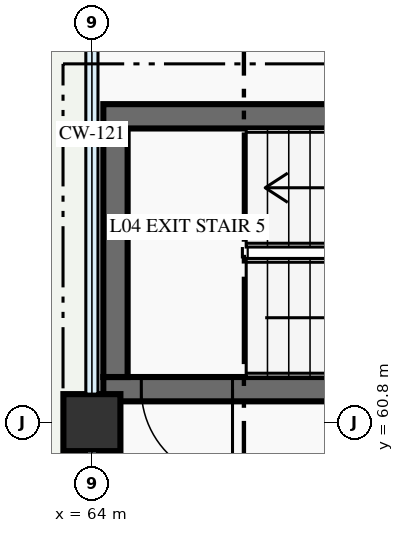
"""IFC4 building model, lengths in metres.
Left out: names, types, materials, properties, quantities, classifications, styles, units other than length and angle.
Written with IfcOpenShell. Run it as: python <this file> out.ifc"""

import sys

from ifc_helpers import new_model, si_unit, direction, frame, frame_2d, origin, origin_2d, place, context, subcontext, project, spatial, rectangle, extrude, element, fill, save


model = new_model("IFC4")
c1 = context("Model", 3, precision=1e-05, world=origin(), true_north=direction((0.0, 1.0)))
c2 = subcontext(c1, "Body", "Model", "MODEL_VIEW")
j1 = project(units=[si_unit("LENGTHUNIT", "METRE"), si_unit("PLANEANGLEUNIT", "RADIAN")], contexts=[c1])
p1 = place(None, origin())
s1 = spatial("IfcSite", under=j1, at=p1, CompositionType="ELEMENT")
p2 = place(p1, origin())
s2 = spatial("IfcBuilding", under=s1, at=p2, CompositionType="ELEMENT")
p3 = place(p2, frame((0.0, 0.0, 14.7)))
s3 = spatial("IfcBuildingStorey", under=s2, at=p3, CompositionType="ELEMENT", Elevation=14.7)
p4 = place(p3, frame((64.0, 60.8, 0.0), z_axis=(0.0, 0.0, 1.0), x_axis=(1.0, 0.0, 0.0)))
e1 = element("IfcColumn", 1, at=p4, inside=s3, PredefinedType="COLUMN", context=c2, shape_type="SweptSolid", body=[
    extrude(rectangle(XDim=0.75, YDim=0.75, at=origin_2d()), origin(), (0.0, 0.0, 1.0), 4.2),
])
p5 = place(p3, frame((71.85, 61.24, 0.0), z_axis=(0.0, 0.0, 1.0), x_axis=(-1.0, 0.0, 0.0)))
e2 = element("IfcWall", 2, at=p5, inside=s3, PredefinedType="SHEAR", context=c2, shape_type="SweptSolid", body=[
    extrude(rectangle(XDim=7.7, YDim=0.32, at=frame_2d((3.85, 0.0))), origin(), (0.0, 0.0, 1.0), 4.2),
])
p6 = place(p5, frame((6.0, 0.0, 0.0)))
e3 = element("IfcOpeningElement", 3, at=p6, cuts=e2, PredefinedType="OPENING", context=c2, shape_type="SweptSolid", body=[
    extrude(rectangle(XDim=1.2, YDim=2.2, at=frame_2d((0.6, 1.1))), frame((0.0, 0.17, 0.0), z_axis=(0.0, -1.0, 0.0), x_axis=(1.0, 0.0, 0.0)), (0.0, 0.0, 1.0), 0.34),
])
p7 = place(p3, frame((64.31, 61.4, 0.0), z_axis=(0.0, 0.0, 1.0), x_axis=(0.0, 1.0, 0.0)))
e4 = element("IfcWall", 4, at=p7, inside=s3, PredefinedType="SHEAR", context=c2, shape_type="SweptSolid", body=[
    extrude(rectangle(XDim=3.27, YDim=0.32, at=frame_2d((1.635, 0.0))), origin(), (0.0, 0.0, 1.0), 4.2),
])
p8 = place(p3, frame((64.15, 64.83, 0.0), z_axis=(0.0, 0.0, 1.0), x_axis=(1.0, 0.0, 0.0)))
e5 = element("IfcWall", 5, at=p8, inside=s3, PredefinedType="SHEAR", context=c2, shape_type="SweptSolid", body=[
    extrude(rectangle(XDim=7.7, YDim=0.32, at=frame_2d((3.85, 0.0))), origin(), (0.0, 0.0, 1.0), 4.2),
])
p9 = place(p6, origin())
e6 = element("IfcDoor", 6, at=p9, inside=s3, OperationType="SINGLE_SWING_LEFT", PredefinedType="DOOR", context=c2, shape_type="SweptSolid", body=[
    extrude(rectangle(XDim=1.2, YDim=2.2, at=frame_2d((0.6, 1.1))), frame((0.0, 0.025, 0.0), z_axis=(0.0, -1.0, 0.0), x_axis=(1.0, 0.0, 0.0)), (0.0, 0.0, 1.0), 0.05),
])
fill(e3, e6)
save(model, sys.argv[1])
